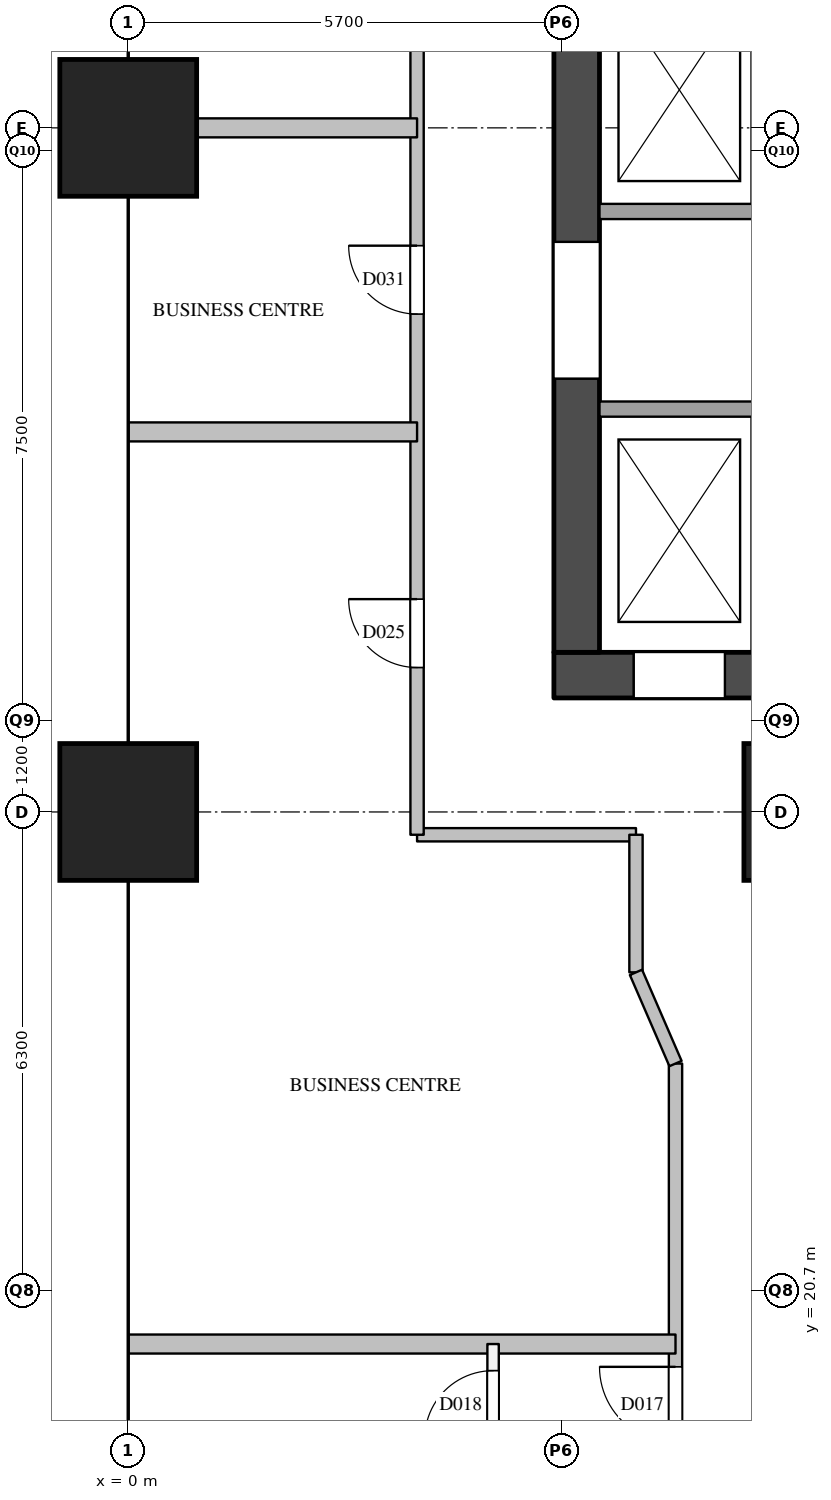
"""IFC4 building model, lengths in metres.
Left out: names, types, materials, properties, quantities, classifications, styles, units other than length and angle.
Written with IfcOpenShell. Run it as: python <this file> out.ifc"""

import sys

from ifc_helpers import new_model, si_unit, direction, frame, frame_2d, origin, origin_2d, place, context, subcontext, project, spatial, rectangle, extrude, element, fill, save


model = new_model("IFC4")
c1 = context("Model", 3, precision=1e-05, world=origin(), true_north=direction((0.0, 1.0)))
c2 = subcontext(c1, "Body", "Model", "MODEL_VIEW")
j1 = project(units=[si_unit("LENGTHUNIT", "METRE"), si_unit("PLANEANGLEUNIT", "RADIAN")], contexts=[c1])
p1 = place(None, origin())
s1 = spatial("IfcSite", under=j1, at=p1, CompositionType="ELEMENT")
p2 = place(p1, origin())
s2 = spatial("IfcBuilding", under=s1, at=p2, CompositionType="ELEMENT")
p3 = place(p2, frame((0.0, 0.0, 34.8)))
s3 = spatial("IfcBuildingStorey", under=s2, at=p3, CompositionType="ELEMENT", Elevation=34.8)
for number, where, z_axis, x_axis in (
    (1, (0.0, 27.0, 0.0), (0.0, 0.0, 1.0), (1.0, 0.0, 0.0)),
    (2, (0.0, 36.0, 0.0), (0.0, 0.0, 1.0), (1.0, 0.0, 0.0)),
    (3, (9.0, 27.0, 0.0), (0.0, 0.0, 1.0), (1.0, 0.0, 0.0)),
):
    element("IfcColumn", number, at=place(p3, frame(where, z_axis=z_axis, x_axis=x_axis)), inside=s3, PredefinedType="COLUMN", context=c2, shape_type="SweptSolid", body=[
        extrude(rectangle(XDim=1.8, YDim=1.8, at=origin_2d()), origin(), (0.0, 0.0, 1.0), 3.8),
    ])
p4 = place(p3, frame((5.6, 28.8, 0.0), z_axis=(0.0, 0.0, 1.0), x_axis=(1.0, 0.0, 0.0)))
e4 = element("IfcWall", 4, at=p4, inside=s3, PredefinedType="SHEAR", context=c2, shape_type="SweptSolid", body=[
    extrude(rectangle(XDim=12.4, YDim=0.6, at=frame_2d((6.2, 0.0))), origin(), (0.0, 0.0, 1.0), 3.5),
])
p5 = place(p4, frame((1.05, 0.0, 0.0)))
e5 = element("IfcOpeningElement", 5, at=p5, cuts=e4, PredefinedType="OPENING", context=c2, shape_type="SweptSolid", body=[
    extrude(rectangle(XDim=1.2, YDim=2.1, at=frame_2d((0.6, 1.05))), frame((0.0, 0.31, 0.0), z_axis=(0.0, -1.0, 0.0), x_axis=(1.0, 0.0, 0.0)), (0.0, 0.0, 1.0), 0.62),
])
p6 = place(p4, frame((5.25, 0.0, 0.0)))
e6 = element("IfcOpeningElement", 6, at=p6, cuts=e4, PredefinedType="OPENING", context=c2, shape_type="SweptSolid", body=[
    extrude(rectangle(XDim=1.2, YDim=2.1, at=frame_2d((0.6, 1.05))), frame((0.0, 0.31, 0.0), z_axis=(0.0, -1.0, 0.0), x_axis=(1.0, 0.0, 0.0)), (0.0, 0.0, 1.0), 0.62),
])
p7 = place(p4, frame((7.35, 0.0, 0.0)))
e7 = element("IfcOpeningElement", 7, at=p7, cuts=e4, PredefinedType="OPENING", context=c2, shape_type="SweptSolid", body=[
    extrude(rectangle(XDim=1.2, YDim=2.1, at=frame_2d((0.6, 1.05))), frame((0.0, 0.31, 0.0), z_axis=(0.0, -1.0, 0.0), x_axis=(1.0, 0.0, 0.0)), (0.0, 0.0, 1.0), 0.62),
])
p8 = place(p3, frame((5.9, 29.1, 0.0), z_axis=(0.0, 0.0, 1.0), x_axis=(0.0, 1.0, 0.0)))
e8 = element("IfcWall", 8, at=p8, inside=s3, PredefinedType="SHEAR", context=c2, shape_type="SweptSolid", body=[
    extrude(rectangle(XDim=20.3, YDim=0.6, at=frame_2d((10.15, 0.0))), origin(), (0.0, 0.0, 1.0), 3.5),
])
p9 = place(p8, frame((3.6, 0.0, 0.0)))
e9 = element("IfcOpeningElement", 9, at=p9, cuts=e8, PredefinedType="OPENING", context=c2, shape_type="SweptSolid", body=[
    extrude(rectangle(XDim=1.8, YDim=2.1, at=frame_2d((0.9, 1.05))), frame((0.0, 0.31, 0.0), z_axis=(0.0, -1.0, 0.0), x_axis=(1.0, 0.0, 0.0)), (0.0, 0.0, 1.0), 0.62),
])
p10 = place(p8, frame((16.4, 0.0, 0.0)))
e10 = element("IfcOpeningElement", 10, at=p10, cuts=e8, PredefinedType="OPENING", context=c2, shape_type="SweptSolid", body=[
    extrude(rectangle(XDim=1.0, YDim=2.1, at=frame_2d((0.5, 1.05))), frame((0.0, 0.31, 0.0), z_axis=(0.0, -1.0, 0.0), x_axis=(1.0, 0.0, 0.0)), (0.0, 0.0, 1.0), 0.62),
])
p11 = place(p3, frame((6.2, 32.3, 0.0), z_axis=(0.0, 0.0, 1.0), x_axis=(1.0, 0.0, 0.0)))
e11 = element("IfcWall", 11, at=p11, inside=s3, PredefinedType="SOLIDWALL", context=c2, shape_type="SweptSolid", body=[
    extrude(rectangle(XDim=11.2, YDim=0.2, at=frame_2d((5.6, 0.0))), origin(), (0.0, 0.0, 1.0), 3.5),
])
p12 = place(p11, frame((2.55, 0.0, 0.0)))
e12 = element("IfcOpeningElement", 12, at=p12, cuts=e11, PredefinedType="OPENING", context=c2, shape_type="SweptSolid", body=[
    extrude(rectangle(XDim=1.2, YDim=2.1, at=frame_2d((0.6, 1.05))), frame((0.0, 0.11, 0.0), z_axis=(0.0, -1.0, 0.0), x_axis=(1.0, 0.0, 0.0)), (0.0, 0.0, 1.0), 0.22),
])
p13 = place(p3, frame((6.2, 34.9, 0.0), z_axis=(0.0, 0.0, 1.0), x_axis=(1.0, 0.0, 0.0)))
e13 = element("IfcWall", 13, at=p13, inside=s3, PredefinedType="SOLIDWALL", context=c2, shape_type="SweptSolid", body=[
    extrude(rectangle(XDim=11.2, YDim=0.2, at=frame_2d((5.6, 0.0))), origin(), (0.0, 0.0, 1.0), 3.5),
])
p14 = place(p3, frame((3.8, 26.7, 0.0), z_axis=(0.0, 0.0, 1.0), x_axis=(1.0, 0.0, 0.0)))
e14 = element("IfcWall", 14, at=p14, inside=s3, PredefinedType="PARTITIONING", context=c2, shape_type="SweptSolid", body=[
    extrude(rectangle(XDim=2.88, YDim=0.175, at=frame_2d((1.44, 0.0))), origin(), (0.0, 0.0, 1.0), 2.5),
])
p15 = place(p3, frame((3.8, 26.7, 0.0), z_axis=(0.0, 0.0, 1.0), x_axis=(0.0, 1.0, 0.0)))
e15 = element("IfcWall", 15, at=p15, inside=s3, PredefinedType="PARTITIONING", context=c2, shape_type="SweptSolid", body=[
    extrude(rectangle(XDim=25.1, YDim=0.175, at=frame_2d((12.55, 0.0))), origin(), (0.0, 0.0, 1.0), 2.5),
])
p16 = place(p15, frame((2.2, 0.0, 0.0)))
e16 = element("IfcOpeningElement", 16, at=p16, cuts=e15, PredefinedType="OPENING", context=c2, shape_type="SweptSolid", body=[
    extrude(rectangle(XDim=0.9, YDim=2.1, at=frame_2d((0.45, 1.05))), frame((0.0, 0.097, 0.0), z_axis=(0.0, -1.0, 0.0), x_axis=(1.0, 0.0, 0.0)), (0.0, 0.0, 1.0), 0.195),
])
p17 = place(p15, frame((6.85, 0.0, 0.0)))
e17 = element("IfcOpeningElement", 17, at=p17, cuts=e15, PredefinedType="OPENING", context=c2, shape_type="SweptSolid", body=[
    extrude(rectangle(XDim=0.9, YDim=2.1, at=frame_2d((0.45, 1.05))), frame((0.0, 0.097, 0.0), z_axis=(0.0, -1.0, 0.0), x_axis=(1.0, 0.0, 0.0)), (0.0, 0.0, 1.0), 0.195),
])
p18 = place(p15, frame((16.75, 0.0, 0.0)))
e18 = element("IfcOpeningElement", 18, at=p18, cuts=e15, PredefinedType="OPENING", context=c2, shape_type="SweptSolid", body=[
    extrude(rectangle(XDim=0.9, YDim=2.1, at=frame_2d((0.45, 1.05))), frame((0.0, 0.097, 0.0), z_axis=(0.0, -1.0, 0.0), x_axis=(1.0, 0.0, 0.0)), (0.0, 0.0, 1.0), 0.195),
])
p19 = place(p3, frame((6.68, 24.89, 0.0), z_axis=(0.0, 0.0, 1.0), x_axis=(0.0, 1.0, 0.0)))
e19 = element("IfcWall", 19, at=p19, inside=s3, PredefinedType="PARTITIONING", context=c2, shape_type="SweptSolid", body=[
    extrude(rectangle(XDim=1.81, YDim=0.175, at=frame_2d((0.905, 0.0))), origin(), (0.0, 0.0, 1.0), 2.5),
])
p20 = place(p3, frame((7.2, 7.2, 0.0), z_axis=(0.0, 0.0, 1.0), x_axis=(0.0, 1.0, 0.0)))
e20 = element("IfcWall", 20, at=p20, inside=s3, PredefinedType="PARTITIONING", context=c2, shape_type="SweptSolid", body=[
    extrude(rectangle(XDim=16.49, YDim=0.175, at=frame_2d((8.245, 0.0))), origin(), (0.0, 0.0, 1.0), 3.5),
])
p21 = place(p20, frame((5.5, 0.0, 0.0)))
e21 = element("IfcOpeningElement", 21, at=p21, cuts=e20, PredefinedType="OPENING", context=c2, shape_type="SweptSolid", body=[
    extrude(rectangle(XDim=1.0, YDim=2.1, at=frame_2d((0.5, 1.05))), frame((0.0, 0.097, 0.0), z_axis=(0.0, -1.0, 0.0), x_axis=(1.0, 0.0, 0.0)), (0.0, 0.0, 1.0), 0.195),
])
p22 = place(p20, frame((11.5, 0.0, 0.0)))
e22 = element("IfcOpeningElement", 22, at=p22, cuts=e20, PredefinedType="OPENING", context=c2, shape_type="SweptSolid", body=[
    extrude(rectangle(XDim=1.0, YDim=2.1, at=frame_2d((0.5, 1.05))), frame((0.0, 0.097, 0.0), z_axis=(0.0, -1.0, 0.0), x_axis=(1.0, 0.0, 0.0)), (0.0, 0.0, 1.0), 0.195),
])
p23 = place(p3, frame((4.8, 18.4, 0.0), z_axis=(0.0, 0.0, 1.0), x_axis=(0.0, 1.0, 0.0)))
e23 = element("IfcWall", 23, at=p23, inside=s3, PredefinedType="PARTITIONING", context=c2, shape_type="SweptSolid", body=[
    extrude(rectangle(XDim=1.6, YDim=0.15, at=frame_2d((0.8, 0.0))), origin(), (0.0, 0.0, 1.0), 3.5),
])
p24 = place(p23, frame((0.35, 0.0, 0.0)))
e24 = element("IfcOpeningElement", 24, at=p24, cuts=e23, PredefinedType="OPENING", context=c2, shape_type="SweptSolid", body=[
    extrude(rectangle(XDim=0.9, YDim=2.1, at=frame_2d((0.45, 1.05))), frame((0.0, 0.085, 0.0), z_axis=(0.0, -1.0, 0.0), x_axis=(1.0, 0.0, 0.0)), (0.0, 0.0, 1.0), 0.17),
])
p25 = place(p3, frame((0.0, 20.0, 0.0), z_axis=(0.0, 0.0, 1.0), x_axis=(1.0, 0.0, 0.0)))
e25 = element("IfcWall", 25, at=p25, inside=s3, PredefinedType="PARTITIONING", context=c2, shape_type="SweptSolid", body=[
    extrude(rectangle(XDim=7.2, YDim=0.25, at=frame_2d((3.6, 0.0))), origin(), (0.0, 0.0, 1.0), 2.5),
])
p26 = place(p3, frame((0.0, 32.0, 0.0), z_axis=(0.0, 0.0, 1.0), x_axis=(1.0, 0.0, 0.0)))
e26 = element("IfcWall", 26, at=p26, inside=s3, PredefinedType="PARTITIONING", context=c2, shape_type="SweptSolid", body=[
    extrude(rectangle(XDim=3.8, YDim=0.25, at=frame_2d((1.9, 0.0))), origin(), (0.0, 0.0, 1.0), 2.5),
])
p27 = place(p3, frame((0.0, 36.0, 0.0), z_axis=(0.0, 0.0, 1.0), x_axis=(1.0, 0.0, 0.0)))
e27 = element("IfcWall", 27, at=p27, inside=s3, PredefinedType="PARTITIONING", context=c2, shape_type="SweptSolid", body=[
    extrude(rectangle(XDim=3.8, YDim=0.25, at=frame_2d((1.9, 0.0))), origin(), (0.0, 0.0, 1.0), 3.5),
])
p28 = place(p3, frame((7.2, 23.69, 0.0), z_axis=(0.0, 0.0, 1.0), x_axis=(-0.397633632391, 0.917544273804, 0.0)))
e28 = element("IfcWall", 28, at=p28, inside=s3, PredefinedType="PARTITIONING", context=c2, shape_type="SweptSolid", body=[
    extrude(rectangle(XDim=1.308, YDim=0.175, at=frame_2d((0.654, 0.0))), origin(), (0.0, 0.0, 1.0), 3.5),
])
p29 = place(p5, origin())
e29 = element("IfcDoor", 29, at=p29, inside=s3, OperationType="SLIDING_TO_LEFT", PredefinedType="DOOR", context=c2, shape_type="SweptSolid", body=[
    extrude(rectangle(XDim=1.2, YDim=2.1, at=frame_2d((0.6, 1.05))), frame((0.0, 0.025, 0.0), z_axis=(0.0, -1.0, 0.0), x_axis=(1.0, 0.0, 0.0)), (0.0, 0.0, 1.0), 0.05),
])
fill(e5, e29)
p30 = place(p9, origin())
e30 = element("IfcDoor", 30, at=p30, inside=s3, OperationType="DOUBLE_DOOR_SINGLE_SWING", PredefinedType="DOOR", context=c2, shape_type="SweptSolid", body=[
    extrude(rectangle(XDim=1.8, YDim=2.1, at=frame_2d((0.9, 1.05))), frame((0.0, 0.025, 0.0), z_axis=(0.0, -1.0, 0.0), x_axis=(1.0, 0.0, 0.0)), (0.0, 0.0, 1.0), 0.05),
])
fill(e9, e30)
p31 = place(p22, origin())
e31 = element("IfcDoor", 31, at=p31, inside=s3, OperationType="SINGLE_SWING_RIGHT", PredefinedType="DOOR", context=c2, shape_type="SweptSolid", body=[
    extrude(rectangle(XDim=1.0, YDim=2.1, at=frame_2d((0.5, 1.05))), frame((0.0, 0.025, 0.0), z_axis=(0.0, -1.0, 0.0), x_axis=(1.0, 0.0, 0.0)), (0.0, 0.0, 1.0), 0.05),
])
fill(e22, e31)
p32 = place(p24, origin())
e32 = element("IfcDoor", 32, at=p32, inside=s3, OperationType="SINGLE_SWING_LEFT", PredefinedType="DOOR", context=c2, shape_type="SweptSolid", body=[
    extrude(rectangle(XDim=0.9, YDim=2.1, at=frame_2d((0.45, 1.05))), frame((0.0, 0.025, 0.0), z_axis=(0.0, -1.0, 0.0), x_axis=(1.0, 0.0, 0.0)), (0.0, 0.0, 1.0), 0.05),
])
fill(e24, e32)
p33 = place(p16, origin())
e33 = element("IfcDoor", 33, at=p33, inside=s3, OperationType="SINGLE_SWING_RIGHT", PredefinedType="DOOR", context=c2, shape_type="SweptSolid", body=[
    extrude(rectangle(XDim=0.9, YDim=2.1, at=frame_2d((0.45, 1.05))), frame((0.0, 0.025, 0.0), z_axis=(0.0, -1.0, 0.0), x_axis=(1.0, 0.0, 0.0)), (0.0, 0.0, 1.0), 0.05),
])
fill(e16, e33)
p34 = place(p17, origin())
e34 = element("IfcDoor", 34, at=p34, inside=s3, OperationType="SINGLE_SWING_RIGHT", PredefinedType="DOOR", context=c2, shape_type="SweptSolid", body=[
    extrude(rectangle(XDim=0.9, YDim=2.1, at=frame_2d((0.45, 1.05))), frame((0.0, 0.025, 0.0), z_axis=(0.0, -1.0, 0.0), x_axis=(1.0, 0.0, 0.0)), (0.0, 0.0, 1.0), 0.05),
])
fill(e17, e34)
save(model, sys.argv[1])
